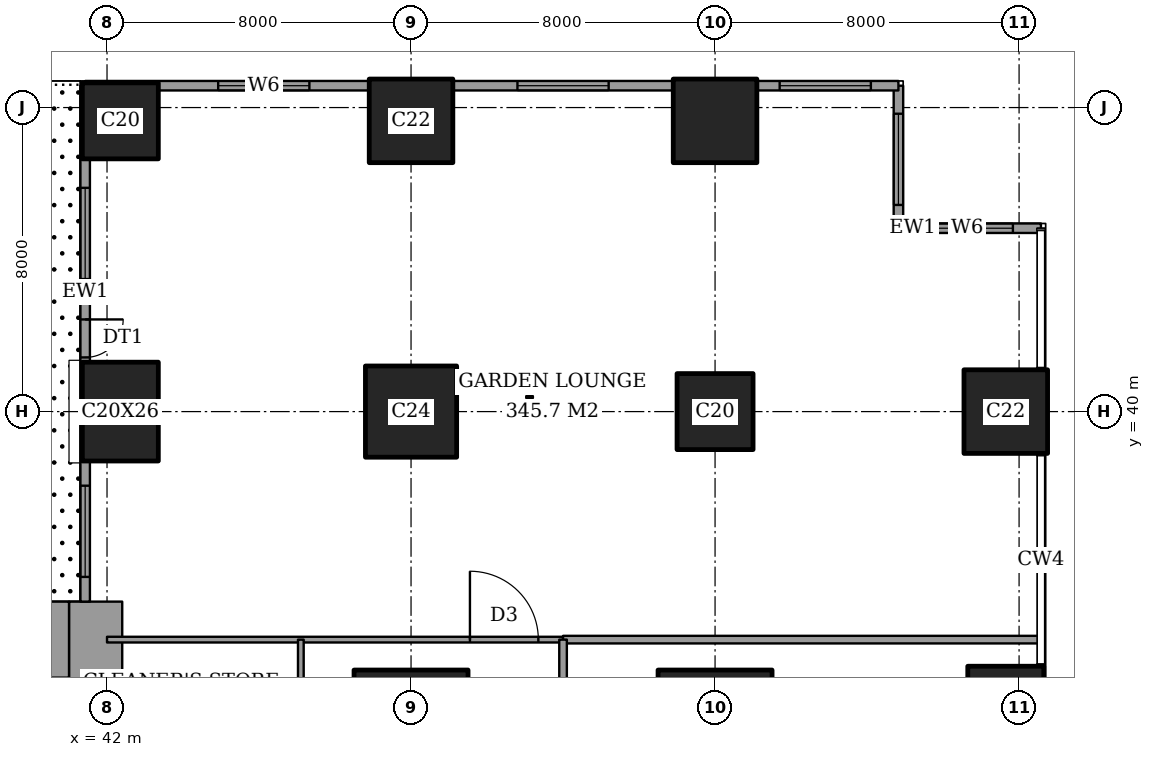
"""IFC4 building model, lengths in metres.
Left out: names, types, materials, properties, quantities, classifications, styles, units other than length and angle.
Written with IfcOpenShell. Run it as: python <this file> out.ifc"""

import sys

from ifc_helpers import new_model, si_unit, direction, frame, frame_2d, origin, origin_2d, place, context, subcontext, project, spatial, rectangle, extrude, element, fill, save


model = new_model("IFC4")
c1 = context("Model", 3, precision=1e-05, world=origin(), true_north=direction((0.0, 1.0)))
c2 = subcontext(c1, "Body", "Model", "MODEL_VIEW")
j1 = project(units=[si_unit("LENGTHUNIT", "METRE"), si_unit("PLANEANGLEUNIT", "RADIAN")], contexts=[c1])
p1 = place(None, origin())
s1 = spatial("IfcSite", under=j1, at=p1, CompositionType="ELEMENT")
p2 = place(p1, origin())
s2 = spatial("IfcBuilding", under=s1, at=p2, CompositionType="ELEMENT")
p3 = place(p2, frame((0.0, 0.0, 26.0)))
s3 = spatial("IfcBuildingStorey", under=s2, at=p3, CompositionType="ELEMENT", Elevation=26.0)
p4 = place(p3, frame((42.35, 40.0, 0.0), z_axis=(0.0, 0.0, 1.0), x_axis=(1.0, 0.0, 0.0)))
e1 = element("IfcColumn", 1, at=p4, inside=s3, PredefinedType="COLUMN", context=c2, shape_type="SweptSolid", body=[
    extrude(rectangle(XDim=2.0, YDim=2.6, at=origin_2d()), origin(), (0.0, 0.0, 1.0), 3.6),
])
p5 = place(p3, frame((42.35, 47.65, 0.0), z_axis=(0.0, 0.0, 1.0), x_axis=(1.0, 0.0, 0.0)))
e2 = element("IfcColumn", 2, at=p5, inside=s3, PredefinedType="COLUMN", context=c2, shape_type="SweptSolid", body=[
    extrude(rectangle(XDim=2.0, YDim=2.0, at=origin_2d()), origin(), (0.0, 0.0, 1.0), 3.6),
])
p6 = place(p3, frame((50.0, 32.0, 0.0), z_axis=(0.0, 0.0, 1.0), x_axis=(1.0, 0.0, 0.0)))
e3 = element("IfcColumn", 3, at=p6, inside=s3, PredefinedType="COLUMN", context=c2, shape_type="SweptSolid", body=[
    extrude(rectangle(XDim=3.0, YDim=2.4, at=origin_2d()), origin(), (0.0, 0.0, 1.0), 3.6),
])
p7 = place(p3, frame((50.0, 40.0, 0.0), z_axis=(0.0, 0.0, 1.0), x_axis=(1.0, 0.0, 0.0)))
e4 = element("IfcColumn", 4, at=p7, inside=s3, PredefinedType="COLUMN", context=c2, shape_type="SweptSolid", body=[
    extrude(rectangle(XDim=2.4, YDim=2.4, at=origin_2d()), origin(), (0.0, 0.0, 1.0), 3.6),
])
p8 = place(p3, frame((50.0, 47.65, 0.0), z_axis=(0.0, 0.0, 1.0), x_axis=(1.0, 0.0, 0.0)))
e5 = element("IfcColumn", 5, at=p8, inside=s3, PredefinedType="COLUMN", context=c2, shape_type="SweptSolid", body=[
    extrude(rectangle(XDim=2.2, YDim=2.2, at=origin_2d()), origin(), (0.0, 0.0, 1.0), 3.6),
])
p9 = place(p3, frame((58.0, 32.0, 0.0), z_axis=(0.0, 0.0, 1.0), x_axis=(1.0, 0.0, 0.0)))
e6 = element("IfcColumn", 6, at=p9, inside=s3, PredefinedType="COLUMN", context=c2, shape_type="SweptSolid", body=[
    extrude(rectangle(XDim=3.0, YDim=2.4, at=origin_2d()), origin(), (0.0, 0.0, 1.0), 3.6),
])
p10 = place(p3, frame((58.0, 40.0, 0.0), z_axis=(0.0, 0.0, 1.0), x_axis=(1.0, 0.0, 0.0)))
e7 = element("IfcColumn", 7, at=p10, inside=s3, PredefinedType="COLUMN", context=c2, shape_type="SweptSolid", body=[
    extrude(rectangle(XDim=2.0, YDim=2.0, at=origin_2d()), origin(), (0.0, 0.0, 1.0), 3.6),
])
p11 = place(p3, frame((58.0, 47.65, 0.0), z_axis=(0.0, 0.0, 1.0), x_axis=(1.0, 0.0, 0.0)))
e8 = element("IfcColumn", 8, at=p11, inside=s3, PredefinedType="COLUMN", context=c2, shape_type="SweptSolid", body=[
    extrude(rectangle(XDim=2.2, YDim=2.2, at=origin_2d()), origin(), (0.0, 0.0, 1.0), 3.6),
])
p12 = place(p3, frame((65.65, 32.0, 0.0), z_axis=(0.0, 0.0, 1.0), x_axis=(0.0, 1.0, 0.0)))
e9 = element("IfcColumn", 9, at=p12, inside=s3, PredefinedType="COLUMN", context=c2, shape_type="SweptSolid", body=[
    extrude(rectangle(XDim=2.6, YDim=2.0, at=origin_2d()), origin(), (0.0, 0.0, 1.0), 3.6),
])
p13 = place(p3, frame((65.65, 40.0, 0.0), z_axis=(0.0, 0.0, 1.0), x_axis=(1.0, 0.0, 0.0)))
e10 = element("IfcColumn", 10, at=p13, inside=s3, PredefinedType="COLUMN", context=c2, shape_type="SweptSolid", body=[
    extrude(rectangle(XDim=2.2, YDim=2.2, at=origin_2d()), origin(), (0.0, 0.0, 1.0), 3.6),
])
p14 = place(p3, frame((37.85, 34.0, 0.0), z_axis=(0.0, 0.0, 1.0), x_axis=(1.0, 0.0, 0.0)))
e11 = element("IfcWall", 11, at=p14, inside=s3, PredefinedType="SHEAR", context=c2, shape_type="SweptSolid", body=[
    extrude(rectangle(XDim=3.15, YDim=2.0, at=frame_2d((1.575, 0.0))), origin(), (0.0, 0.0, 1.0), 3.6),
])
p15 = place(p3, frame((41.7, 24.85, 0.0), z_axis=(0.0, 0.0, 1.0), x_axis=(0.0, 1.0, 0.0)))
e12 = element("IfcWall", 12, at=p15, inside=s3, PredefinedType="SHEAR", context=c2, shape_type="SweptSolid", body=[
    extrude(rectangle(XDim=10.15, YDim=1.4, at=frame_2d((5.075, 0.0))), origin(), (0.0, 0.0, 1.0), 3.6),
])
p16 = place(p3, frame((66.575, 44.825, 0.0), z_axis=(0.0, 0.0, 1.0), x_axis=(-1.0, 0.0, 0.0)))
e13 = element("IfcWall", 13, at=p16, inside=s3, PredefinedType="SOLIDWALL", context=c2, shape_type="SweptSolid", body=[
    extrude(rectangle(XDim=3.75, YDim=0.25, at=frame_2d((1.875, 0.0))), origin(), (0.0, 0.0, 1.0), 3.6),
])
p17 = place(p16, frame((0.738, 0.0, 0.6)))
e14 = element("IfcOpeningElement", 14, at=p17, cuts=e13, PredefinedType="OPENING", context=c2, shape_type="SweptSolid", body=[
    extrude(rectangle(XDim=2.4, YDim=2.0, at=frame_2d((1.2, 1.0))), frame((0.0, 0.135, 0.0), z_axis=(0.0, -1.0, 0.0), x_axis=(1.0, 0.0, 0.0)), (0.0, 0.0, 1.0), 0.27),
])
p18 = place(p3, frame((62.825, 44.825, 0.0), z_axis=(0.0, 0.0, 1.0), x_axis=(0.0, 1.0, 0.0)))
e15 = element("IfcWall", 15, at=p18, inside=s3, PredefinedType="SOLIDWALL", context=c2, shape_type="SweptSolid", body=[
    extrude(rectangle(XDim=3.75, YDim=0.25, at=frame_2d((1.875, 0.0))), origin(), (0.0, 0.0, 1.0), 3.6),
])
p19 = place(p18, frame((0.613, 0.0, 0.6)))
e16 = element("IfcOpeningElement", 16, at=p19, cuts=e15, PredefinedType="OPENING", context=c2, shape_type="SweptSolid", body=[
    extrude(rectangle(XDim=2.4, YDim=2.0, at=frame_2d((1.2, 1.0))), frame((0.0, 0.135, 0.0), z_axis=(0.0, -1.0, 0.0), x_axis=(1.0, 0.0, 0.0)), (0.0, 0.0, 1.0), 0.27),
])
p20 = place(p3, frame((62.825, 48.575, 0.0), z_axis=(0.0, 0.0, 1.0), x_axis=(-1.0, 0.0, 0.0)))
e17 = element("IfcWall", 17, at=p20, inside=s3, PredefinedType="SOLIDWALL", context=c2, shape_type="SweptSolid", body=[
    extrude(rectangle(XDim=21.4, YDim=0.25, at=frame_2d((10.7, 0.0))), origin(), (0.0, 0.0, 1.0), 3.6),
])
p21 = place(p20, frame((0.725, 0.0, 0.6)))
e18 = element("IfcOpeningElement", 18, at=p21, cuts=e17, PredefinedType="OPENING", context=c2, shape_type="SweptSolid", body=[
    extrude(rectangle(XDim=2.4, YDim=2.0, at=frame_2d((1.2, 1.0))), frame((0.0, 0.135, 0.0), z_axis=(0.0, -1.0, 0.0), x_axis=(1.0, 0.0, 0.0)), (0.0, 0.0, 1.0), 0.27),
])
p22 = place(p20, frame((7.625, 0.0, 0.6)))
e19 = element("IfcOpeningElement", 19, at=p22, cuts=e17, PredefinedType="OPENING", context=c2, shape_type="SweptSolid", body=[
    extrude(rectangle(XDim=2.4, YDim=2.0, at=frame_2d((1.2, 1.0))), frame((0.0, 0.135, 0.0), z_axis=(0.0, -1.0, 0.0), x_axis=(1.0, 0.0, 0.0)), (0.0, 0.0, 1.0), 0.27),
])
p23 = place(p20, frame((15.5, 0.0, 0.6)))
e20 = element("IfcOpeningElement", 20, at=p23, cuts=e17, PredefinedType="OPENING", context=c2, shape_type="SweptSolid", body=[
    extrude(rectangle(XDim=2.4, YDim=2.0, at=frame_2d((1.2, 1.0))), frame((0.0, 0.135, 0.0), z_axis=(0.0, -1.0, 0.0), x_axis=(1.0, 0.0, 0.0)), (0.0, 0.0, 1.0), 0.27),
])
p24 = place(p3, frame((41.425, 48.575, 0.0), z_axis=(0.0, 0.0, 1.0), x_axis=(0.0, -1.0, 0.0)))
e21 = element("IfcWall", 21, at=p24, inside=s3, PredefinedType="SOLIDWALL", context=c2, shape_type="SweptSolid", body=[
    extrude(rectangle(XDim=13.575, YDim=0.25, at=frame_2d((6.788, 0.0))), origin(), (0.0, 0.0, 1.0), 3.6),
])
p25 = place(p24, frame((6.15, 0.0, 0.0)))
e22 = element("IfcOpeningElement", 22, at=p25, cuts=e21, PredefinedType="OPENING", context=c2, shape_type="SweptSolid", body=[
    extrude(rectangle(XDim=1.0, YDim=2.4, at=frame_2d((0.5, 1.2))), frame((0.0, 0.135, 0.0), z_axis=(0.0, -1.0, 0.0), x_axis=(1.0, 0.0, 0.0)), (0.0, 0.0, 1.0), 0.27),
])
p26 = place(p24, frame((2.688, 0.0, 0.6)))
e23 = element("IfcOpeningElement", 23, at=p26, cuts=e21, PredefinedType="OPENING", context=c2, shape_type="SweptSolid", body=[
    extrude(rectangle(XDim=2.4, YDim=2.0, at=frame_2d((1.2, 1.0))), frame((0.0, 0.135, 0.0), z_axis=(0.0, -1.0, 0.0), x_axis=(1.0, 0.0, 0.0)), (0.0, 0.0, 1.0), 0.27),
])
p27 = place(p24, frame((10.525, 0.0, 0.6)))
e24 = element("IfcOpeningElement", 24, at=p27, cuts=e21, PredefinedType="OPENING", context=c2, shape_type="SweptSolid", body=[
    extrude(rectangle(XDim=2.4, YDim=2.0, at=frame_2d((1.2, 1.0))), frame((0.0, 0.135, 0.0), z_axis=(0.0, -1.0, 0.0), x_axis=(1.0, 0.0, 0.0)), (0.0, 0.0, 1.0), 0.27),
])
p28 = place(p3, frame((54.0, 34.0, 0.0), z_axis=(0.0, 0.0, 1.0), x_axis=(1.0, 0.0, 0.0)))
e25 = element("IfcWall", 25, at=p28, inside=s3, PredefinedType="PARTITIONING", context=c2, shape_type="SweptSolid", body=[
    extrude(rectangle(XDim=12.561, YDim=0.2, at=frame_2d((6.281, 0.0))), origin(), (0.0, 0.0, 1.0), 3.35),
])
p29 = place(p3, frame((42.0, 34.0, 0.0), z_axis=(0.0, 0.0, 1.0), x_axis=(1.0, 0.0, 0.0)))
e26 = element("IfcWall", 26, at=p29, inside=s3, PredefinedType="PARTITIONING", context=c2, shape_type="SweptSolid", body=[
    extrude(rectangle(XDim=12.0, YDim=0.15, at=frame_2d((6.0, 0.0))), origin(), (0.0, 0.0, 1.0), 3.35),
])
p30 = place(p29, frame((9.55, 0.0, 0.0)))
e27 = element("IfcOpeningElement", 27, at=p30, cuts=e26, PredefinedType="OPENING", context=c2, shape_type="SweptSolid", body=[
    extrude(rectangle(XDim=1.8, YDim=2.1, at=frame_2d((0.9, 1.05))), frame((0.0, 0.085, 0.0), z_axis=(0.0, -1.0, 0.0), x_axis=(1.0, 0.0, 0.0)), (0.0, 0.0, 1.0), 0.17),
])
p31 = place(p3, frame((47.1, 31.0, 0.0), z_axis=(0.0, 0.0, 1.0), x_axis=(0.0, 1.0, 0.0)))
e28 = element("IfcWall", 28, at=p31, inside=s3, PredefinedType="PARTITIONING", context=c2, shape_type="SweptSolid", body=[
    extrude(rectangle(XDim=3.0, YDim=0.15, at=frame_2d((1.5, 0.0))), origin(), (0.0, 0.0, 1.0), 3.35),
])
p32 = place(p31, frame((1.05, 0.0, 0.0)))
e29 = element("IfcOpeningElement", 29, at=p32, cuts=e28, PredefinedType="OPENING", context=c2, shape_type="SweptSolid", body=[
    extrude(rectangle(XDim=0.9, YDim=2.1, at=frame_2d((0.45, 1.05))), frame((0.0, 0.085, 0.0), z_axis=(0.0, -1.0, 0.0), x_axis=(1.0, 0.0, 0.0)), (0.0, 0.0, 1.0), 0.17),
])
p33 = place(p3, frame((54.0, 28.725, 0.0), z_axis=(0.0, 0.0, 1.0), x_axis=(0.0, 1.0, 0.0)))
e30 = element("IfcWall", 30, at=p33, inside=s3, PredefinedType="PARTITIONING", context=c2, shape_type="SweptSolid", body=[
    extrude(rectangle(XDim=5.275, YDim=0.2, at=frame_2d((2.637, 0.0))), origin(), (0.0, 0.0, 1.0), 3.35),
])
p34 = place(p17, origin())
e31 = element("IfcWindow", 31, at=p34, inside=s3, PartitioningType="SINGLE_PANEL", PredefinedType="WINDOW", context=c2, shape_type="SweptSolid", body=[
    extrude(rectangle(XDim=2.4, YDim=2.0, at=frame_2d((1.2, 1.0))), frame((0.0, 0.03, 0.0), z_axis=(0.0, -1.0, 0.0), x_axis=(1.0, 0.0, 0.0)), (0.0, 0.0, 1.0), 0.06),
])
fill(e14, e31)
p35 = place(p19, origin())
e32 = element("IfcWindow", 32, at=p35, inside=s3, PartitioningType="SINGLE_PANEL", PredefinedType="WINDOW", context=c2, shape_type="SweptSolid", body=[
    extrude(rectangle(XDim=2.4, YDim=2.0, at=frame_2d((1.2, 1.0))), frame((0.0, 0.03, 0.0), z_axis=(0.0, -1.0, 0.0), x_axis=(1.0, 0.0, 0.0)), (0.0, 0.0, 1.0), 0.06),
])
fill(e16, e32)
p36 = place(p21, origin())
e33 = element("IfcWindow", 33, at=p36, inside=s3, PartitioningType="SINGLE_PANEL", PredefinedType="WINDOW", context=c2, shape_type="SweptSolid", body=[
    extrude(rectangle(XDim=2.4, YDim=2.0, at=frame_2d((1.2, 1.0))), frame((0.0, 0.03, 0.0), z_axis=(0.0, -1.0, 0.0), x_axis=(1.0, 0.0, 0.0)), (0.0, 0.0, 1.0), 0.06),
])
fill(e18, e33)
p37 = place(p22, origin())
e34 = element("IfcWindow", 34, at=p37, inside=s3, PartitioningType="SINGLE_PANEL", PredefinedType="WINDOW", context=c2, shape_type="SweptSolid", body=[
    extrude(rectangle(XDim=2.4, YDim=2.0, at=frame_2d((1.2, 1.0))), frame((0.0, 0.03, 0.0), z_axis=(0.0, -1.0, 0.0), x_axis=(1.0, 0.0, 0.0)), (0.0, 0.0, 1.0), 0.06),
])
fill(e19, e34)
p38 = place(p23, origin())
e35 = element("IfcWindow", 35, at=p38, inside=s3, PartitioningType="SINGLE_PANEL", PredefinedType="WINDOW", context=c2, shape_type="SweptSolid", body=[
    extrude(rectangle(XDim=2.4, YDim=2.0, at=frame_2d((1.2, 1.0))), frame((0.0, 0.03, 0.0), z_axis=(0.0, -1.0, 0.0), x_axis=(1.0, 0.0, 0.0)), (0.0, 0.0, 1.0), 0.06),
])
fill(e20, e35)
p39 = place(p25, origin())
e36 = element("IfcDoor", 36, at=p39, inside=s3, OperationType="SINGLE_SWING_RIGHT", PredefinedType="DOOR", context=c2, shape_type="SweptSolid", body=[
    extrude(rectangle(XDim=1.0, YDim=2.4, at=frame_2d((0.5, 1.2))), frame((0.0, 0.025, 0.0), z_axis=(0.0, -1.0, 0.0), x_axis=(1.0, 0.0, 0.0)), (0.0, 0.0, 1.0), 0.05),
])
fill(e22, e36)
p40 = place(p26, origin())
e37 = element("IfcWindow", 37, at=p40, inside=s3, PartitioningType="SINGLE_PANEL", PredefinedType="WINDOW", context=c2, shape_type="SweptSolid", body=[
    extrude(rectangle(XDim=2.4, YDim=2.0, at=frame_2d((1.2, 1.0))), frame((0.0, 0.03, 0.0), z_axis=(0.0, -1.0, 0.0), x_axis=(1.0, 0.0, 0.0)), (0.0, 0.0, 1.0), 0.06),
])
fill(e23, e37)
p41 = place(p27, origin())
e38 = element("IfcWindow", 38, at=p41, inside=s3, PartitioningType="SINGLE_PANEL", PredefinedType="WINDOW", context=c2, shape_type="SweptSolid", body=[
    extrude(rectangle(XDim=2.4, YDim=2.0, at=frame_2d((1.2, 1.0))), frame((0.0, 0.03, 0.0), z_axis=(0.0, -1.0, 0.0), x_axis=(1.0, 0.0, 0.0)), (0.0, 0.0, 1.0), 0.06),
])
fill(e24, e38)
p42 = place(p30, origin())
e39 = element("IfcDoor", 39, at=p42, inside=s3, OperationType="DOUBLE_DOOR_DOUBLE_SWING", PredefinedType="DOOR", context=c2, shape_type="SweptSolid", body=[
    extrude(rectangle(XDim=1.8, YDim=2.1, at=frame_2d((0.9, 1.05))), frame((0.0, 0.025, 0.0), z_axis=(0.0, -1.0, 0.0), x_axis=(1.0, 0.0, 0.0)), (0.0, 0.0, 1.0), 0.05),
])
fill(e27, e39)
save(model, sys.argv[1])
